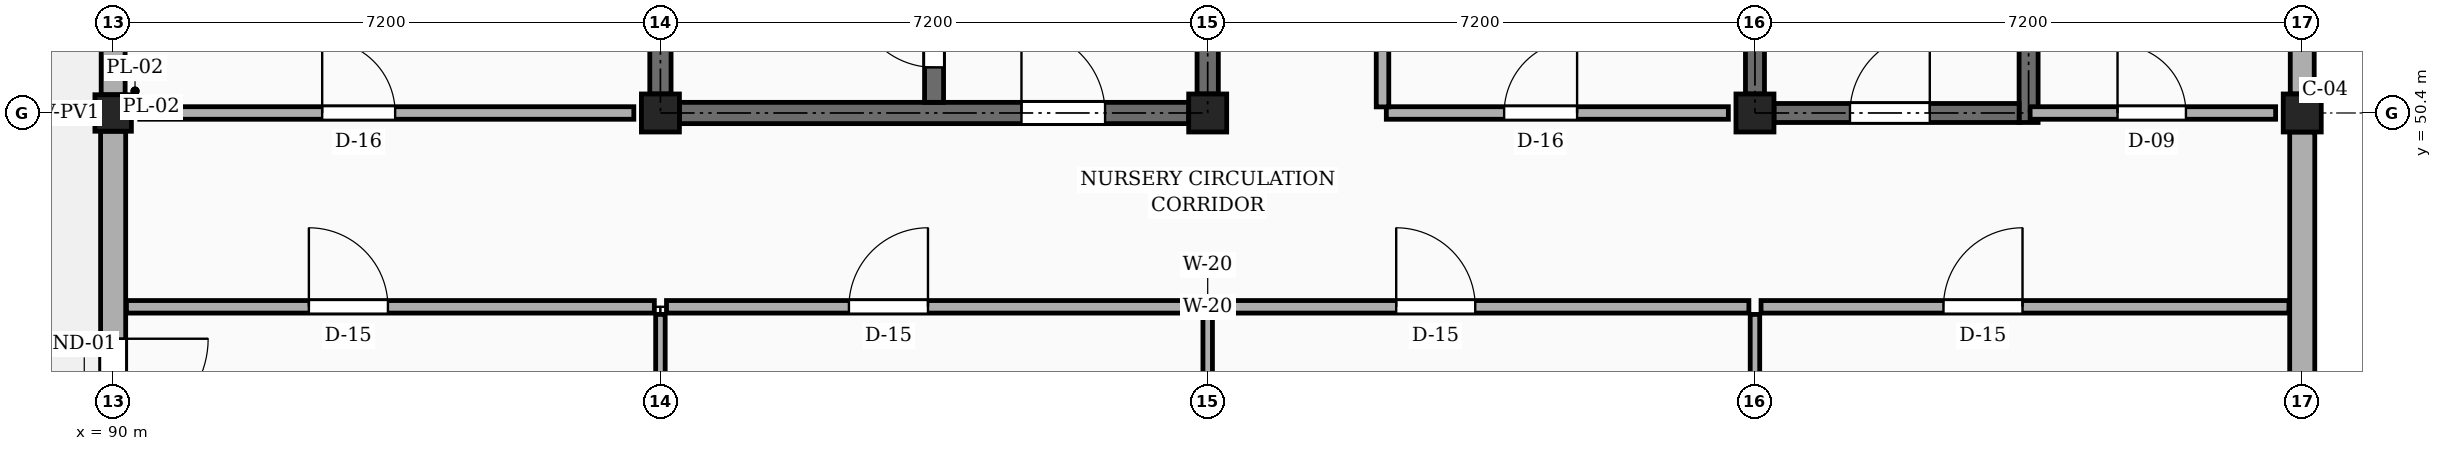
"""IFC4 building model, lengths in metres.
Left out: names, types, materials, properties, quantities, classifications, styles, units other than length and angle.
Written with IfcOpenShell. Run it as: python <this file> out.ifc"""

import sys

from ifc_helpers import new_model, si_unit, direction, frame, frame_2d, origin, origin_2d, place, context, subcontext, project, spatial, rectangle, extrude, element, fill, save


model = new_model("IFC4")
c1 = context("Model", 3, precision=1e-05, world=origin(), true_north=direction((0.0, 1.0)))
c2 = subcontext(c1, "Body", "Model", "MODEL_VIEW")
j1 = project(units=[si_unit("LENGTHUNIT", "METRE"), si_unit("PLANEANGLEUNIT", "RADIAN")], contexts=[c1])
p1 = place(None, origin())
s1 = spatial("IfcSite", under=j1, at=p1, CompositionType="ELEMENT")
p2 = place(p1, origin())
s2 = spatial("IfcBuilding", under=s1, at=p2, CompositionType="ELEMENT")
p3 = place(p2, origin())
s3 = spatial("IfcBuildingStorey", under=s2, at=p3, CompositionType="ELEMENT", Elevation=0.0)
p4 = place(p3, frame((90.0, 50.4, 0.0), z_axis=(0.0, 0.0, 1.0), x_axis=(1.0, 0.0, 0.0)))
e1 = element("IfcColumn", 1, at=p4, inside=s3, PredefinedType="PILASTER", context=c2, shape_type="SweptSolid", body=[
    extrude(rectangle(XDim=0.48, YDim=0.48, at=origin_2d()), origin(), (0.0, 0.0, 1.0), 4.5),
])
for number, where, z_axis, x_axis in (
    (2, (97.2, 50.4, 0.0), (0.0, 0.0, 1.0), (1.0, 0.0, 0.0)),
    (3, (104.4, 50.4, 0.0), (0.0, 0.0, 1.0), (1.0, 0.0, 0.0)),
    (4, (111.6, 50.4, 0.0), (0.0, 0.0, 1.0), (1.0, 0.0, 0.0)),
    (5, (118.8, 50.4, 0.0), (0.0, 0.0, 1.0), (1.0, 0.0, 0.0)),
):
    element("IfcColumn", number, at=place(p3, frame(where, z_axis=z_axis, x_axis=x_axis)), inside=s3, PredefinedType="COLUMN", context=c2, shape_type="SweptSolid", body=[
        extrude(rectangle(XDim=0.5, YDim=0.5, at=origin_2d()), origin(), (0.0, 0.0, 1.0), 4.5),
    ])
p5 = place(p3, frame((118.8, 43.44, 0.0), z_axis=(0.0, 0.0, 1.0), x_axis=(0.0, 1.0, 0.0)))
e6 = element("IfcWall", 6, at=p5, inside=s3, PredefinedType="SOLIDWALL", context=c2, shape_type="SweptSolid", body=[
    extrude(rectangle(XDim=6.71, YDim=0.33, at=frame_2d((3.355, 0.0))), origin(), (0.0, 0.0, 1.0), 3.83),
])
p6 = place(p5, frame((1.375, 0.0, 0.85)))
e7 = element("IfcOpeningElement", 7, at=p6, cuts=e6, PredefinedType="OPENING", context=c2, shape_type="SweptSolid", body=[
    extrude(rectangle(XDim=1.8, YDim=2.1, at=frame_2d((0.9, 1.05))), frame((0.0, 0.175, 0.0), z_axis=(0.0, -1.0, 0.0), x_axis=(1.0, 0.0, 0.0)), (0.0, 0.0, 1.0), 0.35),
])
p7 = place(p3, frame((118.8, 50.65, 0.0), z_axis=(0.0, 0.0, 1.0), x_axis=(0.0, 1.0, 0.0)))
e8 = element("IfcWall", 8, at=p7, inside=s3, PredefinedType="SOLIDWALL", context=c2, shape_type="SweptSolid", body=[
    extrude(rectangle(XDim=6.7, YDim=0.315, at=frame_2d((3.35, 0.0))), origin(), (0.0, 0.0, 1.0), 3.83),
])
p8 = place(p7, frame((2.3, 0.0, 0.85)))
e9 = element("IfcOpeningElement", 9, at=p8, cuts=e8, PredefinedType="OPENING", context=c2, shape_type="SweptSolid", body=[
    extrude(rectangle(XDim=2.1, YDim=2.1, at=frame_2d((1.05, 1.05))), frame((0.0, 0.167, 0.0), z_axis=(0.0, -1.0, 0.0), x_axis=(1.0, 0.0, 0.0)), (0.0, 0.0, 1.0), 0.335),
])
p9 = place(p7, frame((5.1, 0.0, 0.0)))
e10 = element("IfcOpeningElement", 10, at=p9, cuts=e8, PredefinedType="OPENING", context=c2, shape_type="SweptSolid", body=[
    extrude(rectangle(XDim=1.6, YDim=2.25, at=frame_2d((0.8, 1.125))), frame((0.0, 0.167, 0.0), z_axis=(0.0, -1.0, 0.0), x_axis=(1.0, 0.0, 0.0)), (0.0, 0.0, 1.0), 0.335),
])
p10 = place(p3, frame((90.0, 57.35, 0.0), z_axis=(0.0, 0.0, 1.0), x_axis=(0.0, -1.0, 0.0)))
e11 = element("IfcWall", 11, at=p10, inside=s3, PredefinedType="SOLIDWALL", context=c2, shape_type="SweptSolid", body=[
    extrude(rectangle(XDim=6.71, YDim=0.315, at=frame_2d((3.355, 0.0))), origin(), (0.0, 0.0, 1.0), 3.83),
])
p11 = place(p10, frame((2.605, 0.0, 0.0)))
e12 = element("IfcOpeningElement", 12, at=p11, cuts=e11, PredefinedType="OPENING", context=c2, shape_type="SweptSolid", body=[
    extrude(rectangle(XDim=1.5, YDim=2.2, at=frame_2d((0.75, 1.1))), frame((0.0, 0.167, 0.0), z_axis=(0.0, -1.0, 0.0), x_axis=(1.0, 0.0, 0.0)), (0.0, 0.0, 1.0), 0.335),
])
p12 = place(p3, frame((90.0, 50.16, 0.0), z_axis=(0.0, 0.0, 1.0), x_axis=(0.0, -1.0, 0.0)))
e13 = element("IfcWall", 13, at=p12, inside=s3, PredefinedType="SOLIDWALL", context=c2, shape_type="SweptSolid", body=[
    extrude(rectangle(XDim=6.71, YDim=0.33, at=frame_2d((3.355, 0.0))), origin(), (0.0, 0.0, 1.0), 3.83),
])
p13 = place(p12, frame((2.73, 0.0, 0.0)))
e14 = element("IfcOpeningElement", 14, at=p13, cuts=e13, PredefinedType="OPENING", context=c2, shape_type="SweptSolid", body=[
    extrude(rectangle(XDim=1.25, YDim=2.15, at=frame_2d((0.625, 1.075))), frame((0.0, 0.175, 0.0), z_axis=(0.0, -1.0, 0.0), x_axis=(1.0, 0.0, 0.0)), (0.0, 0.0, 1.0), 0.35),
])
for number, where, z_axis, x_axis in (
    (15, (97.2, 50.65, 0.0), (0.0, 0.0, 1.0), (0.0, 1.0, 0.0)),
    (16, (104.4, 50.65, 0.0), (0.0, 0.0, 1.0), (0.0, 1.0, 0.0)),
):
    element("IfcWall", number, at=place(p3, frame(where, z_axis=z_axis, x_axis=x_axis)), inside=s3, PredefinedType="SHEAR", context=c2, shape_type="SweptSolid", body=[
        extrude(rectangle(XDim=6.7, YDim=0.28, at=frame_2d((3.35, 0.0))), origin(), (0.0, 0.0, 1.0), 4.26),
    ])
p14 = place(p3, frame((97.45, 50.4, 0.0), z_axis=(0.0, 0.0, 1.0), x_axis=(1.0, 0.0, 0.0)))
e17 = element("IfcWall", 17, at=p14, inside=s3, PredefinedType="SHEAR", context=c2, shape_type="SweptSolid", body=[
    extrude(rectangle(XDim=6.7, YDim=0.28, at=frame_2d((3.35, 0.0))), origin(), (0.0, 0.0, 1.0), 4.26),
])
p15 = place(p14, frame((4.5, 0.0, 0.0)))
e18 = element("IfcOpeningElement", 18, at=p15, cuts=e17, PredefinedType="OPENING", context=c2, shape_type="SweptSolid", body=[
    extrude(rectangle(XDim=1.1, YDim=2.15, at=frame_2d((0.55, 1.075))), frame((0.0, 0.15, 0.0), z_axis=(0.0, -1.0, 0.0), x_axis=(1.0, 0.0, 0.0)), (0.0, 0.0, 1.0), 0.3),
])
p16 = place(p3, frame((100.8, 50.54, 0.0), z_axis=(0.0, 0.0, 1.0), x_axis=(0.0, 1.0, 0.0)))
e19 = element("IfcWall", 19, at=p16, inside=s3, PredefinedType="SHEAR", context=c2, shape_type="SweptSolid", body=[
    extrude(rectangle(XDim=6.92, YDim=0.25, at=frame_2d((3.46, 0.0))), origin(), (0.0, 0.0, 1.0), 4.26),
])
p17 = place(p16, frame((0.46, 0.0, 0.0)))
e20 = element("IfcOpeningElement", 20, at=p17, cuts=e19, PredefinedType="OPENING", context=c2, shape_type="SweptSolid", body=[
    extrude(rectangle(XDim=1.05, YDim=2.15, at=frame_2d((0.525, 1.075))), frame((0.0, 0.135, 0.0), z_axis=(0.0, -1.0, 0.0), x_axis=(1.0, 0.0, 0.0)), (0.0, 0.0, 1.0), 0.27),
])
p18 = place(p3, frame((111.6, 50.65, 0.0), z_axis=(0.0, 0.0, 1.0), x_axis=(0.0, 1.0, 0.0)))
e21 = element("IfcWall", 21, at=p18, inside=s3, PredefinedType="SHEAR", context=c2, shape_type="SweptSolid", body=[
    extrude(rectangle(XDim=6.7, YDim=0.25, at=frame_2d((3.35, 0.0))), origin(), (0.0, 0.0, 1.0), 4.26),
])
p19 = place(p3, frame((115.2, 50.275, 0.0), z_axis=(0.0, 0.0, 1.0), x_axis=(0.0, 1.0, 0.0)))
e22 = element("IfcWall", 22, at=p19, inside=s3, PredefinedType="SHEAR", context=c2, shape_type="SweptSolid", body=[
    extrude(rectangle(XDim=7.45, YDim=0.25, at=frame_2d((3.725, 0.0))), origin(), (0.0, 0.0, 1.0), 4.26),
])
p20 = place(p19, frame((5.71, 0.0, 0.0)))
e23 = element("IfcOpeningElement", 23, at=p20, cuts=e22, PredefinedType="OPENING", context=c2, shape_type="SweptSolid", body=[
    extrude(rectangle(XDim=1.0, YDim=2.15, at=frame_2d((0.5, 1.075))), frame((0.0, 0.135, 0.0), z_axis=(0.0, -1.0, 0.0), x_axis=(1.0, 0.0, 0.0)), (0.0, 0.0, 1.0), 0.27),
])
p21 = place(p3, frame((111.85, 50.4, 0.0), z_axis=(0.0, 0.0, 1.0), x_axis=(1.0, 0.0, 0.0)))
e24 = element("IfcWall", 24, at=p21, inside=s3, PredefinedType="SHEAR", context=c2, shape_type="SweptSolid", body=[
    extrude(rectangle(XDim=3.225, YDim=0.25, at=frame_2d((1.612, 0.0))), origin(), (0.0, 0.0, 1.0), 4.26),
])
p22 = place(p21, frame((1.0, 0.0, 0.0)))
e25 = element("IfcOpeningElement", 25, at=p22, cuts=e24, PredefinedType="OPENING", context=c2, shape_type="SweptSolid", body=[
    extrude(rectangle(XDim=1.05, YDim=2.15, at=frame_2d((0.525, 1.075))), frame((0.0, 0.135, 0.0), z_axis=(0.0, -1.0, 0.0), x_axis=(1.0, 0.0, 0.0)), (0.0, 0.0, 1.0), 0.27),
])
p23 = place(p3, frame((90.175, 47.85, 0.0), z_axis=(0.0, 0.0, 1.0), x_axis=(1.0, 0.0, 0.0)))
e26 = element("IfcWall", 26, at=p23, inside=s3, PredefinedType="PARTITIONING", context=c2, shape_type="SweptSolid", body=[
    extrude(rectangle(XDim=6.945, YDim=0.165, at=frame_2d((3.473, 0.0))), origin(), (0.0, 0.0, 1.0), 3.41),
])
p24 = place(p23, frame((2.4, 0.0, 0.0)))
e27 = element("IfcOpeningElement", 27, at=p24, cuts=e26, PredefinedType="OPENING", context=c2, shape_type="SweptSolid", body=[
    extrude(rectangle(XDim=1.04, YDim=2.12, at=frame_2d((0.52, 1.06))), frame((0.0, 0.093, 0.0), z_axis=(0.0, -1.0, 0.0), x_axis=(1.0, 0.0, 0.0)), (0.0, 0.0, 1.0), 0.185),
])
p25 = place(p3, frame((97.28, 47.85, 0.0), z_axis=(0.0, 0.0, 1.0), x_axis=(1.0, 0.0, 0.0)))
e28 = element("IfcWall", 28, at=p25, inside=s3, PredefinedType="PARTITIONING", context=c2, shape_type="SweptSolid", body=[
    extrude(rectangle(XDim=7.04, YDim=0.165, at=frame_2d((3.52, 0.0))), origin(), (0.0, 0.0, 1.0), 3.41),
])
p26 = place(p25, frame((2.4, 0.0, 0.0)))
e29 = element("IfcOpeningElement", 29, at=p26, cuts=e28, PredefinedType="OPENING", context=c2, shape_type="SweptSolid", body=[
    extrude(rectangle(XDim=1.04, YDim=2.12, at=frame_2d((0.52, 1.06))), frame((0.0, 0.093, 0.0), z_axis=(0.0, -1.0, 0.0), x_axis=(1.0, 0.0, 0.0)), (0.0, 0.0, 1.0), 0.185),
])
p27 = place(p3, frame((104.48, 47.85, 0.0), z_axis=(0.0, 0.0, 1.0), x_axis=(1.0, 0.0, 0.0)))
e30 = element("IfcWall", 30, at=p27, inside=s3, PredefinedType="PARTITIONING", context=c2, shape_type="SweptSolid", body=[
    extrude(rectangle(XDim=7.04, YDim=0.165, at=frame_2d((3.52, 0.0))), origin(), (0.0, 0.0, 1.0), 3.41),
])
p28 = place(p27, frame((2.4, 0.0, 0.0)))
e31 = element("IfcOpeningElement", 31, at=p28, cuts=e30, PredefinedType="OPENING", context=c2, shape_type="SweptSolid", body=[
    extrude(rectangle(XDim=1.04, YDim=2.12, at=frame_2d((0.52, 1.06))), frame((0.0, 0.093, 0.0), z_axis=(0.0, -1.0, 0.0), x_axis=(1.0, 0.0, 0.0)), (0.0, 0.0, 1.0), 0.185),
])
p29 = place(p3, frame((111.68, 47.85, 0.0), z_axis=(0.0, 0.0, 1.0), x_axis=(1.0, 0.0, 0.0)))
e32 = element("IfcWall", 32, at=p29, inside=s3, PredefinedType="PARTITIONING", context=c2, shape_type="SweptSolid", body=[
    extrude(rectangle(XDim=6.945, YDim=0.165, at=frame_2d((3.473, 0.0))), origin(), (0.0, 0.0, 1.0), 3.41),
])
p30 = place(p29, frame((2.4, 0.0, 0.0)))
e33 = element("IfcOpeningElement", 33, at=p30, cuts=e32, PredefinedType="OPENING", context=c2, shape_type="SweptSolid", body=[
    extrude(rectangle(XDim=1.04, YDim=2.12, at=frame_2d((0.52, 1.06))), frame((0.0, 0.093, 0.0), z_axis=(0.0, -1.0, 0.0), x_axis=(1.0, 0.0, 0.0)), (0.0, 0.0, 1.0), 0.185),
])
p31 = place(p3, frame((90.35, 50.4, 0.0), z_axis=(0.0, 0.0, 1.0), x_axis=(1.0, 0.0, 0.0)))
e34 = element("IfcWall", 34, at=p31, inside=s3, PredefinedType="PARTITIONING", context=c2, shape_type="SweptSolid", body=[
    extrude(rectangle(XDim=6.5, YDim=0.165, at=frame_2d((3.25, 0.0))), origin(), (0.0, 0.0, 1.0), 3.41),
])
p32 = place(p31, frame((2.4, 0.0, 0.0)))
e35 = element("IfcOpeningElement", 35, at=p32, cuts=e34, PredefinedType="OPENING", context=c2, shape_type="SweptSolid", body=[
    extrude(rectangle(XDim=0.96, YDim=2.1, at=frame_2d((0.48, 1.05))), frame((0.0, 0.093, 0.0), z_axis=(0.0, -1.0, 0.0), x_axis=(1.0, 0.0, 0.0)), (0.0, 0.0, 1.0), 0.185),
])
p33 = place(p3, frame((106.75, 50.4, 0.0), z_axis=(0.0, 0.0, 1.0), x_axis=(1.0, 0.0, 0.0)))
e36 = element("IfcWall", 36, at=p33, inside=s3, PredefinedType="PARTITIONING", context=c2, shape_type="SweptSolid", body=[
    extrude(rectangle(XDim=4.5, YDim=0.165, at=frame_2d((2.25, 0.0))), origin(), (0.0, 0.0, 1.0), 3.41),
])
p34 = place(p33, frame((1.55, 0.0, 0.0)))
e37 = element("IfcOpeningElement", 37, at=p34, cuts=e36, PredefinedType="OPENING", context=c2, shape_type="SweptSolid", body=[
    extrude(rectangle(XDim=0.96, YDim=2.1, at=frame_2d((0.48, 1.05))), frame((0.0, 0.093, 0.0), z_axis=(0.0, -1.0, 0.0), x_axis=(1.0, 0.0, 0.0)), (0.0, 0.0, 1.0), 0.185),
])
p35 = place(p3, frame((115.22, 50.4, 0.0), z_axis=(0.0, 0.0, 1.0), x_axis=(1.0, 0.0, 0.0)))
e38 = element("IfcWall", 38, at=p35, inside=s3, PredefinedType="PARTITIONING", context=c2, shape_type="SweptSolid", body=[
    extrude(rectangle(XDim=3.23, YDim=0.165, at=frame_2d((1.615, 0.0))), origin(), (0.0, 0.0, 1.0), 3.41),
])
p36 = place(p35, frame((1.15, 0.0, 0.0)))
e39 = element("IfcOpeningElement", 39, at=p36, cuts=e38, PredefinedType="OPENING", context=c2, shape_type="SweptSolid", body=[
    extrude(rectangle(XDim=0.9, YDim=2.05, at=frame_2d((0.45, 1.025))), frame((0.0, 0.093, 0.0), z_axis=(0.0, -1.0, 0.0), x_axis=(1.0, 0.0, 0.0)), (0.0, 0.0, 1.0), 0.185),
])
p37 = place(p3, frame((106.7, 50.48, 0.0), z_axis=(0.0, 0.0, 1.0), x_axis=(0.0, 1.0, 0.0)))
e40 = element("IfcWall", 40, at=p37, inside=s3, PredefinedType="PARTITIONING", context=c2, shape_type="SweptSolid", body=[
    extrude(rectangle(XDim=7.04, YDim=0.165, at=frame_2d((3.52, 0.0))), origin(), (0.0, 0.0, 1.0), 3.41),
])
for number, where, z_axis, x_axis in (
    (41, (97.2, 43.55, 0.0), (0.0, 0.0, 1.0), (0.0, 1.0, 0.0)),
    (42, (104.4, 43.55, 0.0), (0.0, 0.0, 1.0), (0.0, 1.0, 0.0)),
    (43, (111.6, 43.55, 0.0), (0.0, 0.0, 1.0), (0.0, 1.0, 0.0)),
):
    element("IfcWall", number, at=place(p3, frame(where, z_axis=z_axis, x_axis=x_axis)), inside=s3, PredefinedType="PARTITIONING", context=c2, shape_type="SweptSolid", body=[
        extrude(rectangle(XDim=4.2, YDim=0.125, at=frame_2d((2.1, 0.0))), origin(), (0.0, 0.0, 1.0), 3.41),
    ])
p38 = place(p13, frame((1.25, 0.0, 0.0), z_axis=(0.0, 0.0, 1.0), x_axis=(-1.0, 0.0, 0.0)))
e44 = element("IfcDoor", 44, at=p38, inside=s3, OperationType="SINGLE_SWING_LEFT", PredefinedType="DOOR", context=c2, shape_type="SweptSolid", body=[
    extrude(rectangle(XDim=1.25, YDim=2.15, at=frame_2d((0.625, 1.075))), frame((0.0, 0.025, 0.0), z_axis=(0.0, -1.0, 0.0), x_axis=(1.0, 0.0, 0.0)), (0.0, 0.0, 1.0), 0.05),
])
fill(e14, e44)
p39 = place(p15, frame((1.1, 0.0, 0.0), z_axis=(0.0, 0.0, 1.0), x_axis=(-1.0, 0.0, 0.0)))
e45 = element("IfcDoor", 45, at=p39, inside=s3, OperationType="SINGLE_SWING_LEFT", PredefinedType="DOOR", context=c2, shape_type="SweptSolid", body=[
    extrude(rectangle(XDim=1.1, YDim=2.15, at=frame_2d((0.55, 1.075))), frame((0.0, 0.025, 0.0), z_axis=(0.0, -1.0, 0.0), x_axis=(1.0, 0.0, 0.0)), (0.0, 0.0, 1.0), 0.05),
])
fill(e18, e45)
p40 = place(p17, frame((1.05, 0.0, 0.0), z_axis=(0.0, 0.0, 1.0), x_axis=(-1.0, 0.0, 0.0)))
e46 = element("IfcDoor", 46, at=p40, inside=s3, OperationType="SINGLE_SWING_RIGHT", PredefinedType="DOOR", context=c2, shape_type="SweptSolid", body=[
    extrude(rectangle(XDim=1.05, YDim=2.15, at=frame_2d((0.525, 1.075))), frame((0.0, 0.025, 0.0), z_axis=(0.0, -1.0, 0.0), x_axis=(1.0, 0.0, 0.0)), (0.0, 0.0, 1.0), 0.05),
])
fill(e20, e46)
p41 = place(p22, frame((1.05, 0.0, 0.0), z_axis=(0.0, 0.0, 1.0), x_axis=(-1.0, 0.0, 0.0)))
e47 = element("IfcDoor", 47, at=p41, inside=s3, OperationType="SINGLE_SWING_RIGHT", PredefinedType="DOOR", context=c2, shape_type="SweptSolid", body=[
    extrude(rectangle(XDim=1.05, YDim=2.15, at=frame_2d((0.525, 1.075))), frame((0.0, 0.025, 0.0), z_axis=(0.0, -1.0, 0.0), x_axis=(1.0, 0.0, 0.0)), (0.0, 0.0, 1.0), 0.05),
])
fill(e25, e47)
p42 = place(p24, origin())
e48 = element("IfcDoor", 48, at=p42, inside=s3, OperationType="SINGLE_SWING_LEFT", PredefinedType="DOOR", context=c2, shape_type="SweptSolid", body=[
    extrude(rectangle(XDim=1.04, YDim=2.12, at=frame_2d((0.52, 1.06))), frame((0.0, 0.025, 0.0), z_axis=(0.0, -1.0, 0.0), x_axis=(1.0, 0.0, 0.0)), (0.0, 0.0, 1.0), 0.05),
])
fill(e27, e48)
p43 = place(p26, origin())
e49 = element("IfcDoor", 49, at=p43, inside=s3, OperationType="SINGLE_SWING_RIGHT", PredefinedType="DOOR", context=c2, shape_type="SweptSolid", body=[
    extrude(rectangle(XDim=1.04, YDim=2.12, at=frame_2d((0.52, 1.06))), frame((0.0, 0.025, 0.0), z_axis=(0.0, -1.0, 0.0), x_axis=(1.0, 0.0, 0.0)), (0.0, 0.0, 1.0), 0.05),
])
fill(e29, e49)
p44 = place(p28, origin())
e50 = element("IfcDoor", 50, at=p44, inside=s3, OperationType="SINGLE_SWING_LEFT", PredefinedType="DOOR", context=c2, shape_type="SweptSolid", body=[
    extrude(rectangle(XDim=1.04, YDim=2.12, at=frame_2d((0.52, 1.06))), frame((0.0, 0.025, 0.0), z_axis=(0.0, -1.0, 0.0), x_axis=(1.0, 0.0, 0.0)), (0.0, 0.0, 1.0), 0.05),
])
fill(e31, e50)
p45 = place(p30, origin())
e51 = element("IfcDoor", 51, at=p45, inside=s3, OperationType="SINGLE_SWING_RIGHT", PredefinedType="DOOR", context=c2, shape_type="SweptSolid", body=[
    extrude(rectangle(XDim=1.04, YDim=2.12, at=frame_2d((0.52, 1.06))), frame((0.0, 0.025, 0.0), z_axis=(0.0, -1.0, 0.0), x_axis=(1.0, 0.0, 0.0)), (0.0, 0.0, 1.0), 0.05),
])
fill(e33, e51)
p46 = place(p32, origin())
e52 = element("IfcDoor", 52, at=p46, inside=s3, OperationType="SINGLE_SWING_LEFT", PredefinedType="DOOR", context=c2, shape_type="SweptSolid", body=[
    extrude(rectangle(XDim=0.96, YDim=2.1, at=frame_2d((0.48, 1.05))), frame((0.0, 0.025, 0.0), z_axis=(0.0, -1.0, 0.0), x_axis=(1.0, 0.0, 0.0)), (0.0, 0.0, 1.0), 0.05),
])
fill(e35, e52)
p47 = place(p34, origin())
e53 = element("IfcDoor", 53, at=p47, inside=s3, OperationType="SINGLE_SWING_RIGHT", PredefinedType="DOOR", context=c2, shape_type="SweptSolid", body=[
    extrude(rectangle(XDim=0.96, YDim=2.1, at=frame_2d((0.48, 1.05))), frame((0.0, 0.025, 0.0), z_axis=(0.0, -1.0, 0.0), x_axis=(1.0, 0.0, 0.0)), (0.0, 0.0, 1.0), 0.05),
])
fill(e37, e53)
p48 = place(p36, origin())
e54 = element("IfcDoor", 54, at=p48, inside=s3, OperationType="SINGLE_SWING_LEFT", PredefinedType="DOOR", context=c2, shape_type="SweptSolid", body=[
    extrude(rectangle(XDim=0.9, YDim=2.05, at=frame_2d((0.45, 1.025))), frame((0.0, 0.025, 0.0), z_axis=(0.0, -1.0, 0.0), x_axis=(1.0, 0.0, 0.0)), (0.0, 0.0, 1.0), 0.05),
])
fill(e39, e54)
save(model, sys.argv[1])
